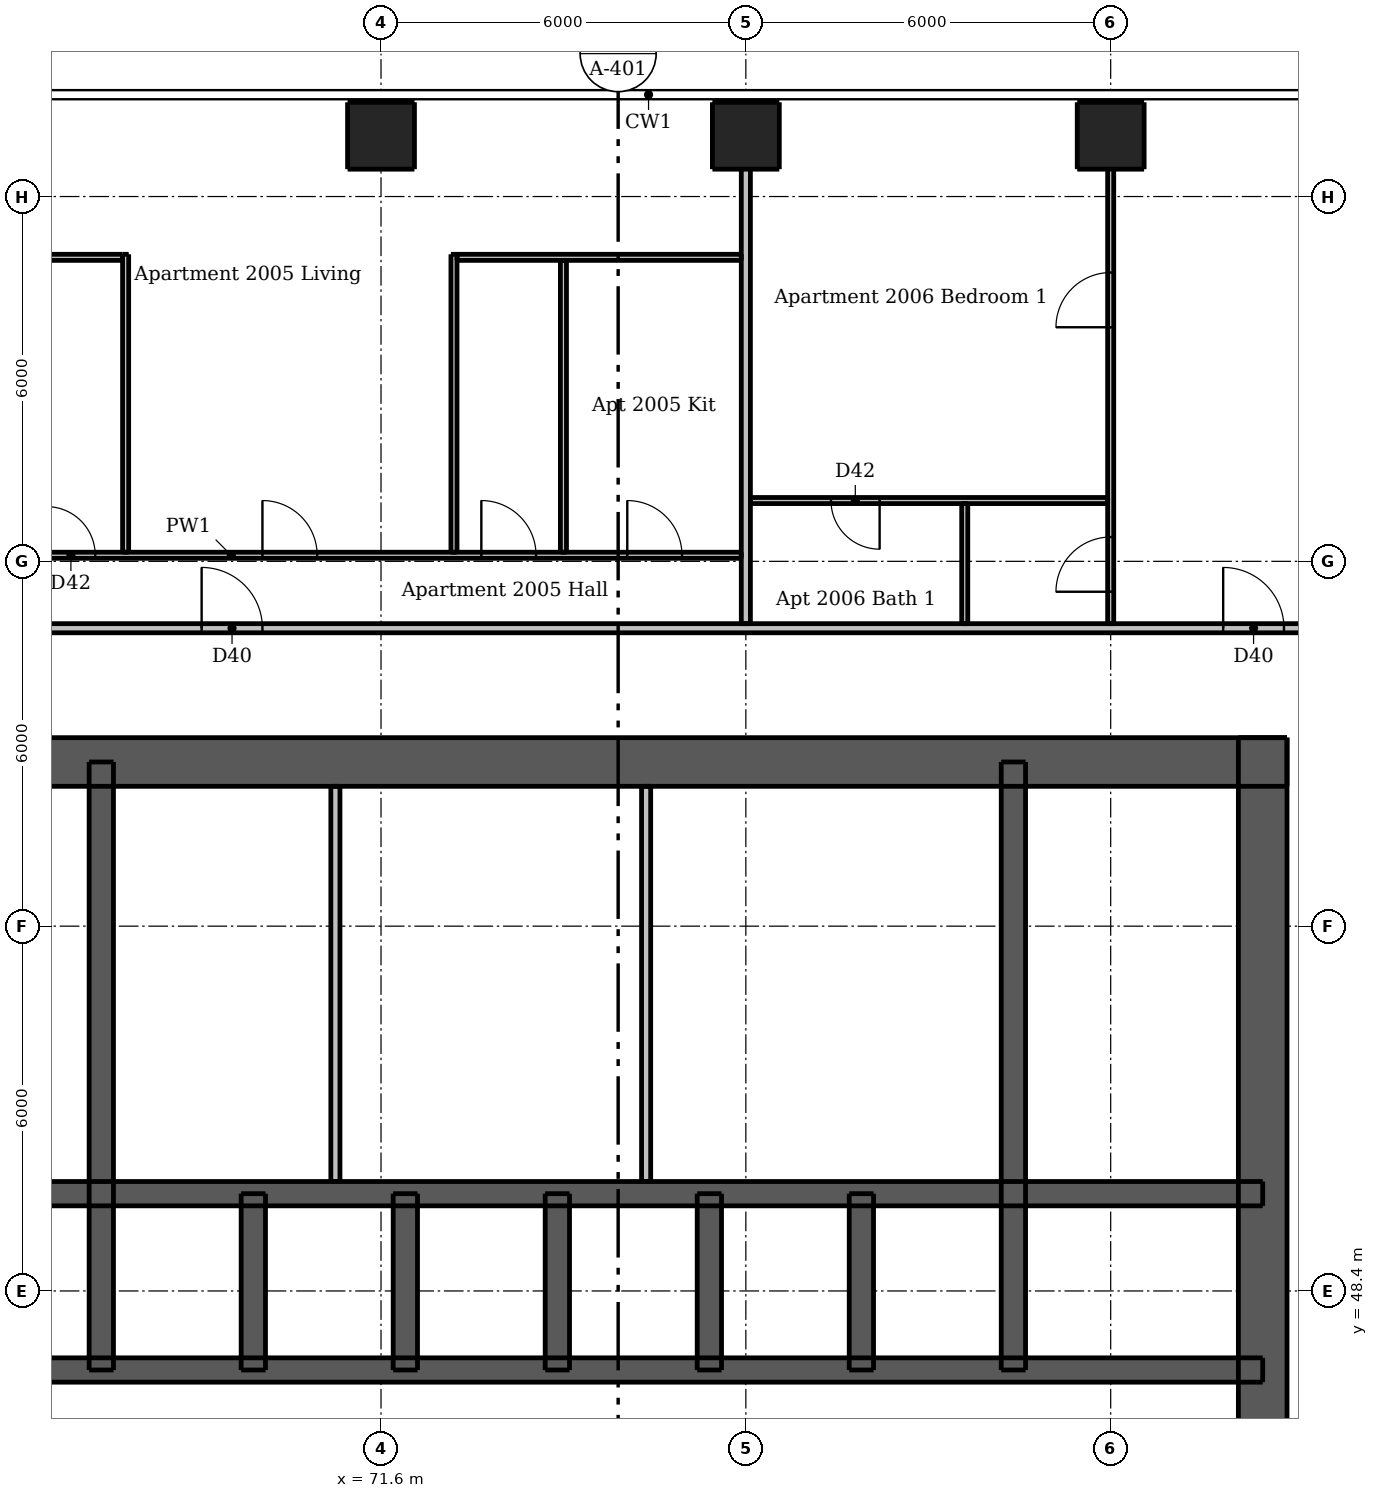
"""IFC4 building model, lengths in metres.
Left out: names, types, materials, properties, quantities, classifications, styles, units other than length and angle.
Written with IfcOpenShell. Run it as: python <this file> out.ifc"""

import sys

from ifc_helpers import new_model, si_unit, direction, frame, frame_2d, origin, origin_2d, place, context, subcontext, project, spatial, rectangle, extrude, element, fill, save


model = new_model("IFC4")
c1 = context("Model", 3, precision=1e-05, world=origin(), true_north=direction((0.0, 1.0)))
c2 = subcontext(c1, "Body", "Model", "MODEL_VIEW")
j1 = project(units=[si_unit("LENGTHUNIT", "METRE"), si_unit("PLANEANGLEUNIT", "RADIAN")], contexts=[c1])
p1 = place(None, origin())
s1 = spatial("IfcSite", under=j1, at=p1, CompositionType="ELEMENT")
p2 = place(p1, origin())
s2 = spatial("IfcBuilding", under=s1, at=p2, CompositionType="ELEMENT")
p3 = place(p2, frame((0.0, 0.0, 78.7)))
s3 = spatial("IfcBuildingStorey", under=s2, at=p3, CompositionType="ELEMENT", Elevation=78.7)
p4 = place(p3, frame((62.5, 57.1, 0.0), z_axis=(0.0, 0.0, 1.0), x_axis=(1.0, 0.0, 0.0)))
e1 = element("IfcWall", 1, at=p4, inside=s3, PredefinedType="SHEAR", context=c2, shape_type="SweptSolid", body=[
    extrude(rectangle(XDim=24.0, YDim=0.8, at=frame_2d((12.0, 0.0))), origin(), (0.0, 0.0, 1.0), 3.05),
])
p5 = place(p4, frame((20.9, 0.0, 0.0)))
e2 = element("IfcOpeningElement", 2, at=p5, cuts=e1, PredefinedType="OPENING", context=c2, shape_type="SweptSolid", body=[
    extrude(rectangle(XDim=1.1, YDim=2.1, at=frame_2d((0.55, 1.05))), frame((0.0, 0.41, 0.0), z_axis=(0.0, -1.0, 0.0), x_axis=(1.0, 0.0, 0.0)), (0.0, 0.0, 1.0), 0.82),
])
p6 = place(p4, frame((2.0, 0.0, 0.0)))
e3 = element("IfcOpeningElement", 3, at=p6, cuts=e1, PredefinedType="OPENING", context=c2, shape_type="SweptSolid", body=[
    extrude(rectangle(XDim=1.1, YDim=2.1, at=frame_2d((0.55, 1.05))), frame((0.0, 0.41, 0.0), z_axis=(0.0, -1.0, 0.0), x_axis=(1.0, 0.0, 0.0)), (0.0, 0.0, 1.0), 0.82),
])
p7 = place(p4, frame((6.075, 0.0, 0.0)))
e4 = element("IfcOpeningElement", 4, at=p7, cuts=e1, PredefinedType="OPENING", context=c2, shape_type="SweptSolid", body=[
    extrude(rectangle(XDim=0.9, YDim=2.1, at=frame_2d((0.45, 1.05))), frame((0.0, 0.41, 0.0), z_axis=(0.0, -1.0, 0.0), x_axis=(1.0, 0.0, 0.0)), (0.0, 0.0, 1.0), 0.82),
])
p8 = place(p4, frame((10.455, 0.0, 0.0)))
e5 = element("IfcOpeningElement", 5, at=p8, cuts=e1, PredefinedType="OPENING", context=c2, shape_type="SweptSolid", body=[
    extrude(rectangle(XDim=0.9, YDim=2.1, at=frame_2d((0.45, 1.05))), frame((0.0, 0.41, 0.0), z_axis=(0.0, -1.0, 0.0), x_axis=(1.0, 0.0, 0.0)), (0.0, 0.0, 1.0), 0.82),
])
p9 = place(p4, frame((15.93, 0.0, 0.0)))
e6 = element("IfcOpeningElement", 6, at=p9, cuts=e1, PredefinedType="OPENING", context=c2, shape_type="SweptSolid", body=[
    extrude(rectangle(XDim=0.9, YDim=2.1, at=frame_2d((0.45, 1.05))), frame((0.0, 0.41, 0.0), z_axis=(0.0, -1.0, 0.0), x_axis=(1.0, 0.0, 0.0)), (0.0, 0.0, 1.0), 0.82),
])
p10 = place(p3, frame((86.1, 33.5, 0.0), z_axis=(0.0, 0.0, 1.0), x_axis=(0.0, 1.0, 0.0)))
e7 = element("IfcWall", 7, at=p10, inside=s3, PredefinedType="SHEAR", context=c2, shape_type="SweptSolid", body=[
    extrude(rectangle(XDim=24.0, YDim=0.8, at=frame_2d((12.0, 0.0))), origin(), (0.0, 0.0, 1.0), 3.05),
])
p11 = place(p10, frame((11.2, 0.0, 0.0)))
e8 = element("IfcOpeningElement", 8, at=p11, cuts=e7, PredefinedType="OPENING", context=c2, shape_type="SweptSolid", body=[
    extrude(rectangle(XDim=1.6, YDim=2.1, at=frame_2d((0.8, 1.05))), frame((0.0, 0.41, 0.0), z_axis=(0.0, -1.0, 0.0), x_axis=(1.0, 0.0, 0.0)), (0.0, 0.0, 1.0), 0.82),
])
p12 = place(p3, frame((62.9, 47.1, 0.0), z_axis=(0.0, 0.0, 1.0), x_axis=(1.0, 0.0, 0.0)))
e9 = element("IfcWall", 9, at=p12, inside=s3, PredefinedType="SHEAR", context=c2, shape_type="SweptSolid", body=[
    extrude(rectangle(XDim=23.2, YDim=0.4, at=frame_2d((11.6, 0.0))), origin(), (0.0, 0.0, 1.0), 3.05),
])
p13 = place(p12, frame((1.7, 0.0, 0.0)))
e10 = element("IfcOpeningElement", 10, at=p13, cuts=e9, PredefinedType="OPENING", context=c2, shape_type="SweptSolid", body=[
    extrude(rectangle(XDim=0.9, YDim=2.1, at=frame_2d((0.45, 1.05))), frame((0.0, 0.21, 0.0), z_axis=(0.0, -1.0, 0.0), x_axis=(1.0, 0.0, 0.0)), (0.0, 0.0, 1.0), 0.42),
])
p14 = place(p12, frame((20.6, 0.0, 0.0)))
e11 = element("IfcOpeningElement", 11, at=p14, cuts=e9, PredefinedType="OPENING", context=c2, shape_type="SweptSolid", body=[
    extrude(rectangle(XDim=0.9, YDim=2.1, at=frame_2d((0.45, 1.05))), frame((0.0, 0.21, 0.0), z_axis=(0.0, -1.0, 0.0), x_axis=(1.0, 0.0, 0.0)), (0.0, 0.0, 1.0), 0.42),
])
p15 = place(p3, frame((62.9, 50.0, 0.0), z_axis=(0.0, 0.0, 1.0), x_axis=(1.0, 0.0, 0.0)))
e12 = element("IfcWall", 12, at=p15, inside=s3, PredefinedType="SHEAR", context=c2, shape_type="SweptSolid", body=[
    extrude(rectangle(XDim=23.2, YDim=0.4, at=frame_2d((11.6, 0.0))), origin(), (0.0, 0.0, 1.0), 3.05),
])
for number, where, z_axis, x_axis in (
    (13, (67.0, 47.1, 0.0), (0.0, 0.0, 1.0), (0.0, 1.0, 0.0)),
    (14, (82.0, 47.1, 0.0), (0.0, 0.0, 1.0), (0.0, 1.0, 0.0)),
):
    element("IfcWall", number, at=place(p3, frame(where, z_axis=z_axis, x_axis=x_axis)), inside=s3, PredefinedType="SHEAR", context=c2, shape_type="SweptSolid", body=[
        extrude(rectangle(XDim=10.0, YDim=0.4, at=frame_2d((5.0, 0.0))), origin(), (0.0, 0.0, 1.0), 3.05),
    ])
for number, where, z_axis, x_axis in (
    (15, (69.5, 47.1, 0.0), (0.0, 0.0, 1.0), (0.0, 1.0, 0.0)),
    (16, (72.0, 47.1, 0.0), (0.0, 0.0, 1.0), (0.0, 1.0, 0.0)),
    (17, (74.5, 47.1, 0.0), (0.0, 0.0, 1.0), (0.0, 1.0, 0.0)),
    (18, (77.0, 47.1, 0.0), (0.0, 0.0, 1.0), (0.0, 1.0, 0.0)),
    (19, (79.5, 47.1, 0.0), (0.0, 0.0, 1.0), (0.0, 1.0, 0.0)),
):
    element("IfcWall", number, at=place(p3, frame(where, z_axis=z_axis, x_axis=x_axis)), inside=s3, PredefinedType="SHEAR", context=c2, shape_type="SweptSolid", body=[
        extrude(rectangle(XDim=2.9, YDim=0.4, at=frame_2d((1.45, 0.0))), origin(), (0.0, 0.0, 1.0), 3.05),
    ])
for number, where, z_axis, x_axis in (
    (20, (71.6, 67.4, 0.0), (0.0, 0.0, 1.0), (1.0, 0.0, 0.0)),
    (21, (77.6, 67.4, 0.0), (0.0, 0.0, 1.0), (1.0, 0.0, 0.0)),
    (22, (83.6, 67.4, 0.0), (0.0, 0.0, 1.0), (1.0, 0.0, 0.0)),
):
    element("IfcColumn", number, at=place(p3, frame(where, z_axis=z_axis, x_axis=x_axis)), inside=s3, PredefinedType="COLUMN", context=c2, shape_type="SweptSolid", body=[
        extrude(rectangle(XDim=1.1, YDim=1.1, at=origin_2d()), origin(), (0.0, 0.0, 1.0), 3.05),
    ])
for number, where, z_axis, x_axis in (
    (23, (70.85, 50.2, 0.0), (0.0, 0.0, 1.0), (0.0, 1.0, 0.0)),
    (24, (75.96, 50.2, 0.0), (0.0, 0.0, 1.0), (0.0, 1.0, 0.0)),
):
    element("IfcWall", number, at=place(p3, frame(where, z_axis=z_axis, x_axis=x_axis)), inside=s3, PredefinedType="PLUMBINGWALL", context=c2, shape_type="SweptSolid", body=[
        extrude(rectangle(XDim=6.5, YDim=0.15, at=frame_2d((3.25, 0.0))), origin(), (0.0, 0.0, 1.0), 3.05),
    ])
for number, where, z_axis, x_axis in (
    (25, (67.4, 60.55, 0.0), (0.0, 0.0, 1.0), (0.0, 1.0, 0.0)),
    (26, (72.8, 60.55, 0.0), (0.0, 0.0, 1.0), (0.0, 1.0, 0.0)),
):
    element("IfcWall", number, at=place(p3, frame(where, z_axis=z_axis, x_axis=x_axis)), inside=s3, PredefinedType="PARTITIONING", context=c2, shape_type="SweptSolid", body=[
        extrude(rectangle(XDim=4.9, YDim=0.1, at=frame_2d((2.45, 0.0))), origin(), (0.0, 0.0, 1.0), 3.05),
    ])
p16 = place(p3, frame((74.6, 60.55, 0.0), z_axis=(0.0, 0.0, 1.0), x_axis=(0.0, 1.0, 0.0)))
e27 = element("IfcWall", 27, at=p16, inside=s3, PredefinedType="PARTITIONING", context=c2, shape_type="SweptSolid", body=[
    extrude(rectangle(XDim=4.8, YDim=0.1, at=frame_2d((2.4, 0.0))), origin(), (0.0, 0.0, 1.0), 3.05),
])
p17 = place(p3, frame((81.2, 59.375, 0.0), z_axis=(0.0, 0.0, 1.0), x_axis=(0.0, 1.0, 0.0)))
e28 = element("IfcWall", 28, at=p17, inside=s3, PredefinedType="PARTITIONING", context=c2, shape_type="SweptSolid", body=[
    extrude(rectangle(XDim=1.975, YDim=0.1, at=frame_2d((0.988, 0.0))), origin(), (0.0, 0.0, 1.0), 3.05),
])
p18 = place(p3, frame((83.6, 59.375, 0.0), z_axis=(0.0, 0.0, 1.0), x_axis=(0.0, 1.0, 0.0)))
e29 = element("IfcWall", 29, at=p18, inside=s3, PredefinedType="PARTITIONING", context=c2, shape_type="SweptSolid", body=[
    extrude(rectangle(XDim=8.625, YDim=0.1, at=frame_2d((4.312, 0.0))), origin(), (0.0, 0.0, 1.0), 2.516),
])
p19 = place(p18, frame((0.525, 0.0, 0.0)))
e30 = element("IfcOpeningElement", 30, at=p19, cuts=e29, PredefinedType="OPENING", context=c2, shape_type="SweptSolid", body=[
    extrude(rectangle(XDim=0.9, YDim=2.1, at=frame_2d((0.45, 1.05))), frame((0.0, 0.06, 0.0), z_axis=(0.0, -1.0, 0.0), x_axis=(1.0, 0.0, 0.0)), (0.0, 0.0, 1.0), 0.12),
])
p20 = place(p18, frame((4.875, 0.0, 0.0)))
e31 = element("IfcOpeningElement", 31, at=p20, cuts=e29, PredefinedType="OPENING", context=c2, shape_type="SweptSolid", body=[
    extrude(rectangle(XDim=0.9, YDim=2.1, at=frame_2d((0.45, 1.05))), frame((0.0, 0.06, 0.0), z_axis=(0.0, -1.0, 0.0), x_axis=(1.0, 0.0, 0.0)), (0.0, 0.0, 1.0), 0.12),
])
p21 = place(p3, frame((63.25, 65.4, 0.0), z_axis=(0.0, 0.0, 1.0), x_axis=(1.0, 0.0, 0.0)))
e32 = element("IfcWall", 32, at=p21, inside=s3, PredefinedType="PARTITIONING", context=c2, shape_type="SweptSolid", body=[
    extrude(rectangle(XDim=4.1, YDim=0.1, at=frame_2d((2.05, 0.0))), origin(), (0.0, 0.0, 1.0), 3.05),
])
p22 = place(p3, frame((72.85, 65.4, 0.0), z_axis=(0.0, 0.0, 1.0), x_axis=(1.0, 0.0, 0.0)))
e33 = element("IfcWall", 33, at=p22, inside=s3, PredefinedType="PARTITIONING", context=c2, shape_type="SweptSolid", body=[
    extrude(rectangle(XDim=4.675, YDim=0.1, at=frame_2d((2.337, 0.0))), origin(), (0.0, 0.0, 1.0), 3.05),
])
p23 = place(p3, frame((83.55, 61.4, 0.0), z_axis=(0.0, 0.0, 1.0), x_axis=(-1.0, 0.0, 0.0)))
e34 = element("IfcWall", 34, at=p23, inside=s3, PredefinedType="PARTITIONING", context=c2, shape_type="SweptSolid", body=[
    extrude(rectangle(XDim=5.875, YDim=0.1, at=frame_2d((2.938, 0.0))), origin(), (0.0, 0.0, 1.0), 3.05),
])
p24 = place(p23, frame((3.75, 0.0, 0.0)))
e35 = element("IfcOpeningElement", 35, at=p24, cuts=e34, PredefinedType="OPENING", context=c2, shape_type="SweptSolid", body=[
    extrude(rectangle(XDim=0.8, YDim=2.1, at=frame_2d((0.4, 1.05))), frame((0.0, 0.06, 0.0), z_axis=(0.0, -1.0, 0.0), x_axis=(1.0, 0.0, 0.0)), (0.0, 0.0, 1.0), 0.12),
])
p25 = place(p3, frame((60.75, 60.5, 0.0), z_axis=(0.0, 0.0, 1.0), x_axis=(1.0, 0.0, 0.0)))
e36 = element("IfcWall", 36, at=p25, inside=s3, PredefinedType="PARTITIONING", context=c2, shape_type="SweptSolid", body=[
    extrude(rectangle(XDim=16.775, YDim=0.1, at=frame_2d((8.387, 0.0))), origin(), (0.0, 0.0, 1.0), 3.05),
])
p26 = place(p25, frame((8.9, 0.0, 0.0)))
e37 = element("IfcOpeningElement", 37, at=p26, cuts=e36, PredefinedType="OPENING", context=c2, shape_type="SweptSolid", body=[
    extrude(rectangle(XDim=0.9, YDim=2.1, at=frame_2d((0.45, 1.05))), frame((0.0, 0.06, 0.0), z_axis=(0.0, -1.0, 0.0), x_axis=(1.0, 0.0, 0.0)), (0.0, 0.0, 1.0), 0.12),
])
p27 = place(p25, frame((14.9, 0.0, 0.0)))
e38 = element("IfcOpeningElement", 38, at=p27, cuts=e36, PredefinedType="OPENING", context=c2, shape_type="SweptSolid", body=[
    extrude(rectangle(XDim=0.9, YDim=2.1, at=frame_2d((0.45, 1.05))), frame((0.0, 0.06, 0.0), z_axis=(0.0, -1.0, 0.0), x_axis=(1.0, 0.0, 0.0)), (0.0, 0.0, 1.0), 0.12),
])
p28 = place(p25, frame((12.5, 0.0, 0.0)))
e39 = element("IfcOpeningElement", 39, at=p28, cuts=e36, PredefinedType="OPENING", context=c2, shape_type="SweptSolid", body=[
    extrude(rectangle(XDim=0.9, YDim=2.1, at=frame_2d((0.45, 1.05))), frame((0.0, 0.06, 0.0), z_axis=(0.0, -1.0, 0.0), x_axis=(1.0, 0.0, 0.0)), (0.0, 0.0, 1.0), 0.12),
])
p29 = place(p25, frame((5.35, 0.0, 0.0)))
e40 = element("IfcOpeningElement", 40, at=p29, cuts=e36, PredefinedType="OPENING", context=c2, shape_type="SweptSolid", body=[
    extrude(rectangle(XDim=0.8, YDim=2.1, at=frame_2d((0.4, 1.05))), frame((0.0, 0.06, 0.0), z_axis=(0.0, -1.0, 0.0), x_axis=(1.0, 0.0, 0.0)), (0.0, 0.0, 1.0), 0.12),
])
p30 = place(p25, frame((0.75, 0.0, 0.0)))
e41 = element("IfcOpeningElement", 41, at=p30, cuts=e36, PredefinedType="OPENING", context=c2, shape_type="SweptSolid", body=[
    extrude(rectangle(XDim=0.9, YDim=2.1, at=frame_2d((0.45, 1.05))), frame((0.0, 0.06, 0.0), z_axis=(0.0, -1.0, 0.0), x_axis=(1.0, 0.0, 0.0)), (0.0, 0.0, 1.0), 0.12),
])
p31 = place(p25, frame((3.25, 0.0, 0.0)))
e42 = element("IfcOpeningElement", 42, at=p31, cuts=e36, PredefinedType="OPENING", context=c2, shape_type="SweptSolid", body=[
    extrude(rectangle(XDim=0.8, YDim=2.1, at=frame_2d((0.4, 1.05))), frame((0.0, 0.06, 0.0), z_axis=(0.0, -1.0, 0.0), x_axis=(1.0, 0.0, 0.0)), (0.0, 0.0, 1.0), 0.12),
])
p32 = place(p3, frame((77.6, 59.375, 0.0), z_axis=(0.0, 0.0, 1.0), x_axis=(0.0, 1.0, 0.0)))
e43 = element("IfcWall", 43, at=p32, inside=s3, PredefinedType="PARTITIONING", context=c2, shape_type="SweptSolid", body=[
    extrude(rectangle(XDim=8.625, YDim=0.15, at=frame_2d((4.312, 0.0))), origin(), (0.0, 0.0, 1.0), 2.516),
])
p33 = place(p3, frame((59.675, 59.3, 0.0), z_axis=(0.0, 0.0, 1.0), x_axis=(1.0, 0.0, 0.0)))
e44 = element("IfcWall", 44, at=p33, inside=s3, PredefinedType="PARTITIONING", context=c2, shape_type="SweptSolid", body=[
    extrude(rectangle(XDim=28.55, YDim=0.15, at=frame_2d((14.275, 0.0))), origin(), (0.0, 0.0, 1.0), 3.05),
])
p34 = place(p33, frame((8.975, 0.0, 0.0)))
e45 = element("IfcOpeningElement", 45, at=p34, cuts=e44, PredefinedType="OPENING", context=c2, shape_type="SweptSolid", body=[
    extrude(rectangle(XDim=1.0, YDim=2.1, at=frame_2d((0.5, 1.05))), frame((0.0, 0.085, 0.0), z_axis=(0.0, -1.0, 0.0), x_axis=(1.0, 0.0, 0.0)), (0.0, 0.0, 1.0), 0.17),
])
p35 = place(p33, frame((25.775, 0.0, 0.0)))
e46 = element("IfcOpeningElement", 46, at=p35, cuts=e44, PredefinedType="OPENING", context=c2, shape_type="SweptSolid", body=[
    extrude(rectangle(XDim=1.0, YDim=2.1, at=frame_2d((0.5, 1.05))), frame((0.0, 0.085, 0.0), z_axis=(0.0, -1.0, 0.0), x_axis=(1.0, 0.0, 0.0)), (0.0, 0.0, 1.0), 0.17),
])
p36 = place(p5, origin())
e47 = element("IfcDoor", 47, at=p36, inside=s3, OperationType="SINGLE_SWING_RIGHT", PredefinedType="DOOR", context=c2, shape_type="SweptSolid", body=[
    extrude(rectangle(XDim=1.1, YDim=2.1, at=frame_2d((0.55, 1.05))), frame((0.0, -0.337, 0.0), z_axis=(0.0, -1.0, 0.0), x_axis=(1.0, 0.0, 0.0)), (0.0, 0.0, 1.0), 0.05),
])
fill(e2, e47)
p37 = place(p14, origin())
e48 = element("IfcDoor", 48, at=p37, inside=s3, OperationType="SINGLE_SWING_LEFT", PredefinedType="DOOR", context=c2, shape_type="SweptSolid", body=[
    extrude(rectangle(XDim=0.9, YDim=2.1, at=frame_2d((0.45, 1.05))), frame((0.0, 0.188, 0.0), z_axis=(0.0, -1.0, 0.0), x_axis=(1.0, 0.0, 0.0)), (0.0, 0.0, 1.0), 0.05),
])
fill(e11, e48)
p38 = place(p7, origin())
e49 = element("IfcDoor", 49, at=p38, inside=s3, OperationType="SINGLE_SWING_RIGHT", PredefinedType="DOOR", context=c2, shape_type="SweptSolid", body=[
    extrude(rectangle(XDim=0.9, YDim=2.1, at=frame_2d((0.45, 1.05))), frame((0.0, -0.337, 0.0), z_axis=(0.0, -1.0, 0.0), x_axis=(1.0, 0.0, 0.0)), (0.0, 0.0, 1.0), 0.05),
])
fill(e4, e49)
p39 = place(p8, origin())
e50 = element("IfcDoor", 50, at=p39, inside=s3, OperationType="SINGLE_SWING_RIGHT", PredefinedType="DOOR", context=c2, shape_type="SweptSolid", body=[
    extrude(rectangle(XDim=0.9, YDim=2.1, at=frame_2d((0.45, 1.05))), frame((0.0, -0.337, 0.0), z_axis=(0.0, -1.0, 0.0), x_axis=(1.0, 0.0, 0.0)), (0.0, 0.0, 1.0), 0.05),
])
fill(e5, e50)
p40 = place(p9, origin())
e51 = element("IfcDoor", 51, at=p40, inside=s3, OperationType="SINGLE_SWING_RIGHT", PredefinedType="DOOR", context=c2, shape_type="SweptSolid", body=[
    extrude(rectangle(XDim=0.9, YDim=2.1, at=frame_2d((0.45, 1.05))), frame((0.0, -0.337, 0.0), z_axis=(0.0, -1.0, 0.0), x_axis=(1.0, 0.0, 0.0)), (0.0, 0.0, 1.0), 0.05),
])
fill(e6, e51)
p41 = place(p34, origin())
e52 = element("IfcDoor", 52, at=p41, inside=s3, OperationType="SINGLE_SWING_LEFT", PredefinedType="DOOR", context=c2, shape_type="SweptSolid", body=[
    extrude(rectangle(XDim=1.0, YDim=2.1, at=frame_2d((0.5, 1.05))), frame((0.0, 0.025, 0.0), z_axis=(0.0, -1.0, 0.0), x_axis=(1.0, 0.0, 0.0)), (0.0, 0.0, 1.0), 0.05),
])
fill(e45, e52)
p42 = place(p26, origin())
e53 = element("IfcDoor", 53, at=p42, inside=s3, OperationType="SINGLE_SWING_LEFT", PredefinedType="DOOR", context=c2, shape_type="SweptSolid", body=[
    extrude(rectangle(XDim=0.9, YDim=2.1, at=frame_2d((0.45, 1.05))), frame((0.0, 0.025, 0.0), z_axis=(0.0, -1.0, 0.0), x_axis=(1.0, 0.0, 0.0)), (0.0, 0.0, 1.0), 0.05),
])
fill(e37, e53)
p43 = place(p27, origin())
e54 = element("IfcDoor", 54, at=p43, inside=s3, OperationType="SINGLE_SWING_LEFT", PredefinedType="DOOR", context=c2, shape_type="SweptSolid", body=[
    extrude(rectangle(XDim=0.9, YDim=2.1, at=frame_2d((0.45, 1.05))), frame((0.0, 0.025, 0.0), z_axis=(0.0, -1.0, 0.0), x_axis=(1.0, 0.0, 0.0)), (0.0, 0.0, 1.0), 0.05),
])
fill(e38, e54)
p44 = place(p28, origin())
e55 = element("IfcDoor", 55, at=p44, inside=s3, OperationType="SINGLE_SWING_LEFT", PredefinedType="DOOR", context=c2, shape_type="SweptSolid", body=[
    extrude(rectangle(XDim=0.9, YDim=2.1, at=frame_2d((0.45, 1.05))), frame((0.0, 0.025, 0.0), z_axis=(0.0, -1.0, 0.0), x_axis=(1.0, 0.0, 0.0)), (0.0, 0.0, 1.0), 0.05),
])
fill(e39, e55)
p45 = place(p29, origin())
e56 = element("IfcDoor", 56, at=p45, inside=s3, OperationType="SINGLE_SWING_LEFT", PredefinedType="DOOR", context=c2, shape_type="SweptSolid", body=[
    extrude(rectangle(XDim=0.8, YDim=2.1, at=frame_2d((0.4, 1.05))), frame((0.0, 0.025, 0.0), z_axis=(0.0, -1.0, 0.0), x_axis=(1.0, 0.0, 0.0)), (0.0, 0.0, 1.0), 0.05),
])
fill(e40, e56)
p46 = place(p35, origin())
e57 = element("IfcDoor", 57, at=p46, inside=s3, OperationType="SINGLE_SWING_LEFT", PredefinedType="DOOR", context=c2, shape_type="SweptSolid", body=[
    extrude(rectangle(XDim=1.0, YDim=2.1, at=frame_2d((0.5, 1.05))), frame((0.0, 0.025, 0.0), z_axis=(0.0, -1.0, 0.0), x_axis=(1.0, 0.0, 0.0)), (0.0, 0.0, 1.0), 0.05),
])
fill(e46, e57)
p47 = place(p19, origin())
e58 = element("IfcDoor", 58, at=p47, inside=s3, OperationType="SINGLE_SWING_LEFT", PredefinedType="DOOR", context=c2, shape_type="SweptSolid", body=[
    extrude(rectangle(XDim=0.9, YDim=2.1, at=frame_2d((0.45, 1.05))), frame((0.0, 0.025, 0.0), z_axis=(0.0, -1.0, 0.0), x_axis=(1.0, 0.0, 0.0)), (0.0, 0.0, 1.0), 0.05),
])
fill(e30, e58)
p48 = place(p20, origin())
e59 = element("IfcDoor", 59, at=p48, inside=s3, OperationType="SINGLE_SWING_LEFT", PredefinedType="DOOR", context=c2, shape_type="SweptSolid", body=[
    extrude(rectangle(XDim=0.9, YDim=2.1, at=frame_2d((0.45, 1.05))), frame((0.0, 0.025, 0.0), z_axis=(0.0, -1.0, 0.0), x_axis=(1.0, 0.0, 0.0)), (0.0, 0.0, 1.0), 0.05),
])
fill(e31, e59)
p49 = place(p24, origin())
e60 = element("IfcDoor", 60, at=p49, inside=s3, OperationType="SINGLE_SWING_LEFT", PredefinedType="DOOR", context=c2, shape_type="SweptSolid", body=[
    extrude(rectangle(XDim=0.8, YDim=2.1, at=frame_2d((0.4, 1.05))), frame((0.0, 0.025, 0.0), z_axis=(0.0, -1.0, 0.0), x_axis=(1.0, 0.0, 0.0)), (0.0, 0.0, 1.0), 0.05),
])
fill(e35, e60)
save(model, sys.argv[1])
